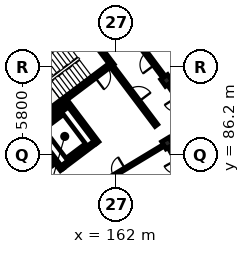
"""IFC4 building model, lengths in metres.
Left out: names, types, materials, properties, quantities, classifications, styles, units other than length and angle.
Written with IfcOpenShell. Run it as: python <this file> out.ifc"""

import sys

from ifc_helpers import new_model, si_unit, direction, frame, frame_2d, origin, origin_2d, place, context, subcontext, project, spatial, rectangle, extrude, element, fill, save


model = new_model("IFC4")
c1 = context("Model", 3, precision=1e-05, world=origin(), true_north=direction((0.0, 1.0)))
c2 = subcontext(c1, "Body", "Model", "MODEL_VIEW")
j1 = project(units=[si_unit("LENGTHUNIT", "METRE"), si_unit("PLANEANGLEUNIT", "RADIAN")], contexts=[c1])
p1 = place(None, origin())
s1 = spatial("IfcSite", under=j1, at=p1, CompositionType="ELEMENT")
p2 = place(p1, origin())
s2 = spatial("IfcBuilding", under=s1, at=p2, CompositionType="ELEMENT")
p3 = place(p2, frame((0.0, 0.0, 12.2)))
s3 = spatial("IfcBuildingStorey", under=s2, at=p3, CompositionType="ELEMENT", Elevation=12.2)
p4 = place(p3, frame((159.707, 94.658, 0.0), z_axis=(0.0, 0.0, 1.0), x_axis=(-0.798639633744, -0.601809550782, 0.0)))
e1 = element("IfcWall", 1, at=p4, inside=s3, PredefinedType="SHEAR", context=c2, shape_type="SweptSolid", body=[
    extrude(rectangle(XDim=6.6, YDim=0.25, at=frame_2d((3.3, 0.0))), origin(), (0.0, 0.0, 1.0), 3.11),
])
p5 = place(p3, frame((159.731, 94.833, 0.0), z_axis=(0.0, 0.0, 1.0), x_axis=(0.601814606132, -0.798635824294, 0.0)))
e2 = element("IfcWall", 2, at=p5, inside=s3, PredefinedType="SHEAR", context=c2, shape_type="SweptSolid", body=[
    extrude(rectangle(XDim=3.42, YDim=0.25, at=frame_2d((1.71, 0.0))), origin(), (0.0, 0.0, 1.0), 3.11),
])
p6 = place(p3, frame((161.615, 92.126, 0.0), z_axis=(0.0, 0.0, 1.0), x_axis=(-0.798639633744, -0.601809550782, 0.0)))
e3 = element("IfcWall", 3, at=p6, inside=s3, PredefinedType="SHEAR", context=c2, shape_type="SweptSolid", body=[
    extrude(rectangle(XDim=6.6, YDim=0.25, at=frame_2d((3.3, 0.0))), origin(), (0.0, 0.0, 1.0), 3.11),
])
p7 = place(p6, frame((0.22, 0.0, 0.0)))
e4 = element("IfcOpeningElement", 4, at=p7, cuts=e3, PredefinedType="OPENING", context=c2, shape_type="SweptSolid", body=[
    extrude(rectangle(XDim=1.05, YDim=2.15, at=frame_2d((0.525, 1.075))), frame((0.0, 0.135, 0.0), z_axis=(0.0, -1.0, 0.0), x_axis=(1.0, 0.0, 0.0)), (0.0, 0.0, 1.0), 0.27),
])
p8 = place(p3, frame((158.827, 89.619, 0.0), z_axis=(0.0, 0.0, 1.0), x_axis=(0.601819781152, -0.798631924615, 0.0)))
e5 = element("IfcWall", 5, at=p8, inside=s3, PredefinedType="SHEAR", context=c2, shape_type="SweptSolid", body=[
    extrude(rectangle(XDim=3.26, YDim=0.23, at=frame_2d((1.63, 0.0))), origin(), (0.0, 0.0, 1.0), 3.11),
])
p9 = place(p8, frame((0.9, 0.0, 0.0)))
e6 = element("IfcOpeningElement", 6, at=p9, cuts=e5, PredefinedType="OPENING", context=c2, shape_type="SweptSolid", body=[
    extrude(rectangle(XDim=1.1, YDim=2.15, at=frame_2d((0.55, 1.075))), frame((0.0, 0.125, 0.0), z_axis=(0.0, -1.0, 0.0), x_axis=(1.0, 0.0, 0.0)), (0.0, 0.0, 1.0), 0.25),
])
p10 = place(p3, frame((156.487, 87.856, 0.0), z_axis=(0.0, 0.0, 1.0), x_axis=(0.601819781152, -0.798631924615, 0.0)))
e7 = element("IfcWall", 7, at=p10, inside=s3, PredefinedType="SHEAR", context=c2, shape_type="SweptSolid", body=[
    extrude(rectangle(XDim=3.26, YDim=0.23, at=frame_2d((1.63, 0.0))), origin(), (0.0, 0.0, 1.0), 3.11),
])
for number, where, z_axis, x_axis in (
    (8, (158.805, 89.458, 0.0), (0.0, 0.0, 1.0), (-0.799, -0.602, 0.0)),
    (9, (160.628, 87.038, 0.0), (0.0, 0.0, 1.0), (-0.799, -0.602, 0.0)),
):
    element("IfcWall", number, at=place(p3, frame(where, z_axis=z_axis, x_axis=x_axis)), inside=s3, PredefinedType="SHEAR", context=c2, shape_type="SweptSolid", body=[
        extrude(rectangle(XDim=2.7, YDim=0.23, at=frame_2d((1.35, 0.0))), origin(), (0.0, 0.0, 1.0), 3.11),
    ])
p11 = place(p3, frame((165.392, 86.991, 0.0), z_axis=(0.0, 0.0, 1.0), x_axis=(0.856166891514, 0.516699384434, 0.0)))
e10 = element("IfcColumn", 10, at=p11, inside=s3, PredefinedType="COLUMN", context=c2, shape_type="SweptSolid", body=[
    extrude(rectangle(XDim=0.55, YDim=0.55, at=origin_2d()), origin(), (0.0, 0.0, 1.0), 3.105),
])
p12 = place(p3, frame((157.461, 85.625, 0.0), z_axis=(0.0, 0.0, 1.0), x_axis=(0.820262803018, 0.571986830255, 0.0)))
e11 = element("IfcColumn", 11, at=p12, inside=s3, PredefinedType="PILASTER", context=c2, shape_type="SweptSolid", body=[
    extrude(rectangle(XDim=0.38, YDim=0.62, at=origin_2d()), origin(), (0.0, 0.0, 1.0), 3.105),
])
p13 = place(p3, frame((165.335, 91.116, 0.0), z_axis=(0.0, 0.0, 1.0), x_axis=(0.820262803018, 0.571986830255, 0.0)))
e12 = element("IfcColumn", 12, at=p13, inside=s3, PredefinedType="COLUMN", context=c2, shape_type="SweptSolid", body=[
    extrude(rectangle(XDim=0.55, YDim=0.55, at=origin_2d()), origin(), (0.0, 0.0, 1.0), 3.105),
])
p14 = place(p3, frame((161.718, 92.073, 0.0), z_axis=(0.0, 0.0, 1.0), x_axis=(0.601792209296, -0.79865270101, 0.0)))
e13 = element("IfcWall", 13, at=p14, inside=s3, PredefinedType="PARTITIONING", context=c2, shape_type="SweptSolid", body=[
    extrude(rectangle(XDim=4.9, YDim=0.22, at=frame_2d((2.45, 0.0))), origin(), (0.0, 0.0, 1.0), 2.34),
])
p15 = place(p14, frame((1.95, 0.0, 0.0)))
e14 = element("IfcOpeningElement", 14, at=p15, cuts=e13, PredefinedType="OPENING", context=c2, shape_type="SweptSolid", body=[
    extrude(rectangle(XDim=1.0, YDim=2.15, at=frame_2d((0.5, 1.075))), frame((0.0, 0.12, 0.0), z_axis=(0.0, -1.0, 0.0), x_axis=(1.0, 0.0, 0.0)), (0.0, 0.0, 1.0), 0.24),
])
p16 = place(p3, frame((166.89, 84.313, 0.0), z_axis=(0.0, 0.0, 1.0), x_axis=(-0.48819576874, 0.872734147025, 0.0)))
e15 = element("IfcWall", 15, at=p16, inside=s3, PredefinedType="PARTITIONING", context=c2, shape_type="SweptSolid", body=[
    extrude(rectangle(XDim=2.718, YDim=0.205, at=frame_2d((1.359, 0.0))), origin(), (0.0, 0.0, 1.0), 2.37),
])
p17 = place(p16, frame((0.894, 0.0, 0.0)))
e16 = element("IfcOpeningElement", 16, at=p17, cuts=e15, PredefinedType="OPENING", context=c2, shape_type="SweptSolid", body=[
    extrude(rectangle(XDim=0.93, YDim=2.12, at=frame_2d((0.465, 1.06))), frame((0.0, 0.113, 0.0), z_axis=(0.0, -1.0, 0.0), x_axis=(1.0, 0.0, 0.0)), (0.0, 0.0, 1.0), 0.225),
])
p18 = place(p3, frame((159.399, 83.374, 0.0), z_axis=(0.0, 0.0, 1.0), x_axis=(0.85616819337, 0.516697227263, 0.0)))
e17 = element("IfcWall", 17, at=p18, inside=s3, PredefinedType="PARTITIONING", context=c2, shape_type="SweptSolid", body=[
    extrude(rectangle(XDim=6.6, YDim=0.125, at=frame_2d((3.3, 0.0))), origin(), (0.0, 0.0, 1.0), 2.37),
])
p19 = place(p18, frame((2.855, 0.0, 0.0)))
e18 = element("IfcOpeningElement", 18, at=p19, cuts=e17, PredefinedType="OPENING", context=c2, shape_type="SweptSolid", body=[
    extrude(rectangle(XDim=0.89, YDim=2.1, at=frame_2d((0.445, 1.05))), frame((0.0, 0.073, 0.0), z_axis=(0.0, -1.0, 0.0), x_axis=(1.0, 0.0, 0.0)), (0.0, 0.0, 1.0), 0.145),
])
p20 = place(p3, frame((167.085, 88.421, 0.0), z_axis=(0.0, 0.0, 1.0), x_axis=(-0.544643612649, 0.838667595178, 0.0)))
e19 = element("IfcWall", 19, at=p20, inside=s3, PredefinedType="PARTITIONING", context=c2, shape_type="SweptSolid", body=[
    extrude(rectangle(XDim=2.863, YDim=0.205, at=frame_2d((1.432, 0.0))), origin(), (0.0, 0.0, 1.0), 2.37),
])
p21 = place(p20, frame((0.937, 0.0, 0.0)))
e20 = element("IfcOpeningElement", 20, at=p21, cuts=e19, PredefinedType="OPENING", context=c2, shape_type="SweptSolid", body=[
    extrude(rectangle(XDim=0.99, YDim=2.16, at=frame_2d((0.495, 1.08))), frame((0.0, 0.113, 0.0), z_axis=(0.0, -1.0, 0.0), x_axis=(1.0, 0.0, 0.0)), (0.0, 0.0, 1.0), 0.225),
])
p22 = place(p3, frame((165.126, 91.396, 0.0), z_axis=(0.0, 0.0, 1.0), x_axis=(-0.598757763243, 0.800930172335, 0.0)))
e21 = element("IfcWall", 21, at=p22, inside=s3, PredefinedType="PARTITIONING", context=c2, shape_type="SweptSolid", body=[
    extrude(rectangle(XDim=2.863, YDim=0.205, at=frame_2d((1.432, 0.0))), origin(), (0.0, 0.0, 1.0), 2.37),
])
p23 = place(p22, frame((0.947, 0.0, 0.0)))
e22 = element("IfcOpeningElement", 22, at=p23, cuts=e21, PredefinedType="OPENING", context=c2, shape_type="SweptSolid", body=[
    extrude(rectangle(XDim=0.97, YDim=2.15, at=frame_2d((0.485, 1.075))), frame((0.0, 0.113, 0.0), z_axis=(0.0, -1.0, 0.0), x_axis=(1.0, 0.0, 0.0)), (0.0, 0.0, 1.0), 0.225),
])
p24 = place(p7, origin())
e23 = element("IfcDoor", 23, at=p24, inside=s3, OperationType="SINGLE_SWING_RIGHT", PredefinedType="DOOR", context=c2, shape_type="SweptSolid", body=[
    extrude(rectangle(XDim=1.05, YDim=2.15, at=frame_2d((0.525, 1.075))), frame((0.0, 0.025, 0.0), z_axis=(0.0, -1.0, 0.0), x_axis=(1.0, 0.0, 0.0)), (0.0, 0.0, 1.0), 0.05),
])
fill(e4, e23)
p25 = place(p9, origin())
e24 = element("IfcDoor", 24, at=p25, inside=s3, OperationType="DOUBLE_DOOR_SLIDING", PredefinedType="DOOR", context=c2, shape_type="SweptSolid", body=[
    extrude(rectangle(XDim=1.1, YDim=2.15, at=frame_2d((0.55, 1.075))), frame((0.0, 0.025, 0.0), z_axis=(0.0, -1.0, 0.0), x_axis=(1.0, 0.0, 0.0)), (0.0, 0.0, 1.0), 0.05),
])
fill(e6, e24)
p26 = place(p15, origin())
e25 = element("IfcDoor", 25, at=p26, inside=s3, OperationType="SINGLE_SWING_RIGHT", PredefinedType="DOOR", context=c2, shape_type="SweptSolid", body=[
    extrude(rectangle(XDim=1.0, YDim=2.15, at=frame_2d((0.5, 1.075))), frame((0.0, 0.025, 0.0), z_axis=(0.0, -1.0, 0.0), x_axis=(1.0, 0.0, 0.0)), (0.0, 0.0, 1.0), 0.05),
])
fill(e14, e25)
p27 = place(p19, origin())
e26 = element("IfcDoor", 26, at=p27, inside=s3, OperationType="SINGLE_SWING_RIGHT", PredefinedType="DOOR", context=c2, shape_type="SweptSolid", body=[
    extrude(rectangle(XDim=0.89, YDim=2.1, at=frame_2d((0.445, 1.05))), frame((0.0, 0.025, 0.0), z_axis=(0.0, -1.0, 0.0), x_axis=(1.0, 0.0, 0.0)), (0.0, 0.0, 1.0), 0.05),
])
fill(e18, e26)
p28 = place(p23, origin())
e27 = element("IfcDoor", 27, at=p28, inside=s3, OperationType="SINGLE_SWING_LEFT", PredefinedType="DOOR", context=c2, shape_type="SweptSolid", body=[
    extrude(rectangle(XDim=0.97, YDim=2.15, at=frame_2d((0.485, 1.075))), frame((0.0, 0.025, 0.0), z_axis=(0.0, -1.0, 0.0), x_axis=(1.0, 0.0, 0.0)), (0.0, 0.0, 1.0), 0.05),
])
fill(e22, e27)
save(model, sys.argv[1])
